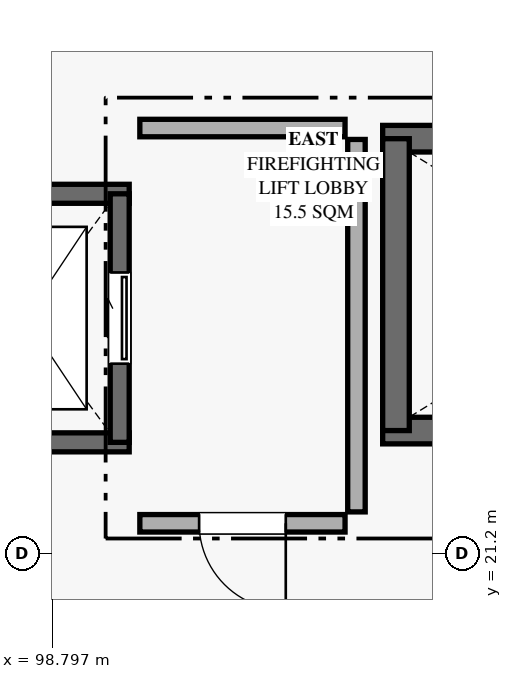
"""IFC4 building model, lengths in metres.
Left out: names, types, materials, properties, quantities, classifications, styles, units other than length and angle.
Written with IfcOpenShell. Run it as: python <this file> out.ifc"""

import sys

from ifc_helpers import new_model, si_unit, direction, frame, frame_2d, origin, place, context, subcontext, project, spatial, rectangle, extrude, element, fill, save


model = new_model("IFC4")
c1 = context("Model", 3, precision=1e-05, world=origin(), true_north=direction((0.0, 1.0)))
c2 = subcontext(c1, "Body", "Model", "MODEL_VIEW")
j1 = project(units=[si_unit("LENGTHUNIT", "METRE"), si_unit("PLANEANGLEUNIT", "RADIAN")], contexts=[c1])
p1 = place(None, origin())
s1 = spatial("IfcSite", under=j1, at=p1, CompositionType="ELEMENT")
p2 = place(p1, origin())
s2 = spatial("IfcBuilding", under=s1, at=p2, CompositionType="ELEMENT")
p3 = place(p2, frame((0.0, 0.0, 5.4)))
s3 = spatial("IfcBuildingStorey", under=s2, at=p3, CompositionType="ELEMENT", Elevation=5.4)
for number, where, z_axis, x_axis in (
    (1, (111.155, 22.82, 0.0), (0.0, 0.0, 1.0), (-1.0, 0.0, 0.0)),
    (2, (103.145, 26.66, 0.0), (0.0, 0.0, 1.0), (1.0, 0.0, 0.0)),
):
    element("IfcWall", number, at=place(p3, frame(where, z_axis=z_axis, x_axis=x_axis)), inside=s3, PredefinedType="SHEAR", context=c2, shape_type="SweptSolid", body=[
        extrude(rectangle(XDim=8.01, YDim=0.35, at=frame_2d((4.005, 0.0))), origin(), (0.0, 0.0, 1.0), 4.77),
    ])
p4 = place(p3, frame((103.32, 22.82, 0.0), z_axis=(0.0, 0.0, 1.0), x_axis=(0.0, 1.0, 0.0)))
e3 = element("IfcWall", 3, at=p4, inside=s3, PredefinedType="SHEAR", context=c2, shape_type="SweptSolid", body=[
    extrude(rectangle(XDim=3.84, YDim=0.35, at=frame_2d((1.92, 0.0))), origin(), (0.0, 0.0, 1.0), 4.77),
])
for number, where, z_axis, x_axis in (
    (4, (99.81, 22.665, 0.0), (0.0, 0.0, 1.0), (-1.0, 0.0, 0.0)),
    (5, (97.09, 25.935, 0.0), (0.0, 0.0, 1.0), (1.0, 0.0, 0.0)),
):
    element("IfcWall", number, at=place(p3, frame(where, z_axis=z_axis, x_axis=x_axis)), inside=s3, PredefinedType="SHEAR", context=c2, shape_type="SweptSolid", body=[
        extrude(rectangle(XDim=2.72, YDim=0.25, at=frame_2d((1.36, 0.0))), origin(), (0.0, 0.0, 1.0), 4.77),
    ])
p5 = place(p3, frame((99.685, 25.935, 0.0), z_axis=(0.0, 0.0, 1.0), x_axis=(0.0, -1.0, 0.0)))
e6 = element("IfcWall", 6, at=p5, inside=s3, PredefinedType="SHEAR", context=c2, shape_type="SweptSolid", body=[
    extrude(rectangle(XDim=3.27, YDim=0.25, at=frame_2d((1.635, 0.0))), origin(), (0.0, 0.0, 1.0), 4.77),
])
p6 = place(p5, frame((1.035, 0.0, 0.0)))
e7 = element("IfcOpeningElement", 7, at=p6, cuts=e6, PredefinedType="OPENING", context=c2, shape_type="SweptSolid", body=[
    extrude(rectangle(XDim=1.2, YDim=2.25, at=frame_2d((0.6, 1.125))), frame((0.0, 0.135, 0.0), z_axis=(0.0, -1.0, 0.0), x_axis=(1.0, 0.0, 0.0)), (0.0, 0.0, 1.0), 0.27),
])
p7 = place(p3, frame((102.65, 21.6, 0.0), z_axis=(0.0, 0.0, 1.0), x_axis=(-1.0, 0.0, 0.0)))
e8 = element("IfcWall", 8, at=p7, inside=s3, PredefinedType="PARTITIONING", context=c2, shape_type="SweptSolid", body=[
    extrude(rectangle(XDim=2.7, YDim=0.23, at=frame_2d((1.35, 0.0))), origin(), (0.0, 0.0, 1.0), 3.52),
])
p8 = place(p7, frame((0.78, 0.0, 0.0)))
e9 = element("IfcOpeningElement", 9, at=p8, cuts=e8, PredefinedType="OPENING", context=c2, shape_type="SweptSolid", body=[
    extrude(rectangle(XDim=1.14, YDim=2.06, at=frame_2d((0.57, 1.03))), frame((0.0, 0.125, 0.0), z_axis=(0.0, -1.0, 0.0), x_axis=(1.0, 0.0, 0.0)), (0.0, 0.0, 1.0), 0.25),
])
p9 = place(p3, frame((99.95, 26.8, 0.0), z_axis=(0.0, 0.0, 1.0), x_axis=(1.0, 0.0, 0.0)))
e10 = element("IfcWall", 10, at=p9, inside=s3, PredefinedType="PARTITIONING", context=c2, shape_type="SweptSolid", body=[
    extrude(rectangle(XDim=2.7, YDim=0.23, at=frame_2d((1.35, 0.0))), origin(), (0.0, 0.0, 1.0), 3.52),
])
p10 = place(p3, frame((102.8, 26.65, 0.0), z_axis=(0.0, 0.0, 1.0), x_axis=(0.0, -1.0, 0.0)))
e11 = element("IfcWall", 11, at=p10, inside=s3, PredefinedType="PARTITIONING", context=c2, shape_type="SweptSolid", body=[
    extrude(rectangle(XDim=4.9, YDim=0.23, at=frame_2d((2.45, 0.0))), origin(), (0.0, 0.0, 1.0), 3.52),
])
p11 = place(p6, origin())
e12 = element("IfcDoor", 12, at=p11, inside=s3, OperationType="SLIDING_TO_LEFT", PredefinedType="DOOR", context=c2, shape_type="SweptSolid", body=[
    extrude(rectangle(XDim=1.2, YDim=2.25, at=frame_2d((0.6, 1.125))), frame((0.0, 0.025, 0.0), z_axis=(0.0, -1.0, 0.0), x_axis=(1.0, 0.0, 0.0)), (0.0, 0.0, 1.0), 0.05),
])
fill(e7, e12)
p12 = place(p8, origin())
e13 = element("IfcDoor", 13, at=p12, inside=s3, OperationType="SINGLE_SWING_LEFT", PredefinedType="DOOR", context=c2, shape_type="SweptSolid", body=[
    extrude(rectangle(XDim=1.14, YDim=2.06, at=frame_2d((0.57, 1.03))), frame((0.0, 0.025, 0.0), z_axis=(0.0, -1.0, 0.0), x_axis=(1.0, 0.0, 0.0)), (0.0, 0.0, 1.0), 0.05),
])
fill(e9, e13)
save(model, sys.argv[1])
